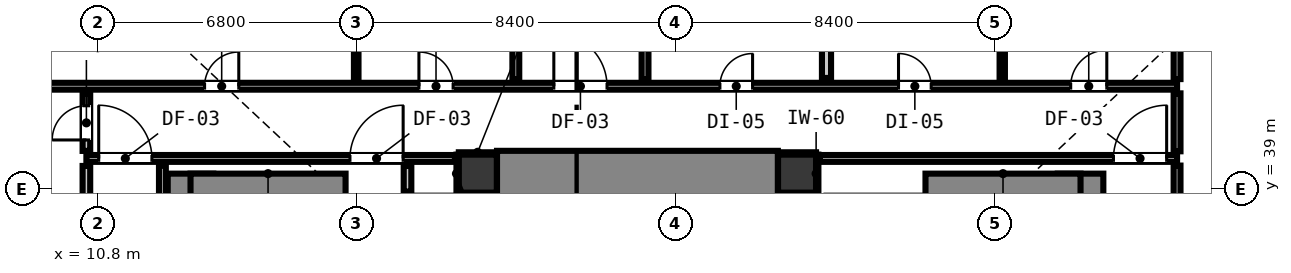
"""IFC4 building model, lengths in metres.
Left out: names, types, materials, properties, quantities, classifications, styles, units other than length and angle.
Written with IfcOpenShell. Run it as: python <this file> out.ifc"""

import sys

from ifc_helpers import new_model, si_unit, direction, frame, frame_2d, origin, origin_2d, place, context, subcontext, project, spatial, rectangle, extrude, element, fill, save


model = new_model("IFC4")
c1 = context("Model", 3, precision=1e-05, world=origin(), true_north=direction((0.0, 1.0)))
c2 = subcontext(c1, "Body", "Model", "MODEL_VIEW")
j1 = project(units=[si_unit("LENGTHUNIT", "METRE"), si_unit("PLANEANGLEUNIT", "RADIAN")], contexts=[c1])
p1 = place(None, origin())
s1 = spatial("IfcSite", under=j1, at=p1, CompositionType="ELEMENT")
p2 = place(p1, origin())
s2 = spatial("IfcBuilding", under=s1, at=p2, CompositionType="ELEMENT")
p3 = place(p2, origin())
s3 = spatial("IfcBuildingStorey", under=s2, at=p3, CompositionType="ELEMENT", Elevation=0.0)
for number, where, z_axis, x_axis in (
    (1, (20.8, 39.4, 0.0), (0.0, 0.0, 1.0), (1.0, 0.0, 0.0)),
    (2, (29.2, 39.4, 0.0), (0.0, 0.0, 1.0), (1.0, 0.0, 0.0)),
):
    element("IfcColumn", number, at=place(p3, frame(where, z_axis=z_axis, x_axis=x_axis)), inside=s3, PredefinedType="COLUMN", context=c2, shape_type="SweptSolid", body=[
        extrude(rectangle(XDim=1.0, YDim=1.0, at=origin_2d()), origin(), (0.0, 0.0, 1.0), 5.2),
    ])
p4 = place(p3, frame((13.24, 31.205, 0.0), z_axis=(0.0, 0.0, 1.0), x_axis=(0.0, 1.0, 0.0)))
e3 = element("IfcWall", 3, at=p4, inside=s3, PredefinedType="SHEAR", context=c2, shape_type="SweptSolid", body=[
    extrude(rectangle(XDim=8.195, YDim=1.2, at=frame_2d((4.097, 0.0))), origin(), (0.0, 0.0, 1.0), 5.2),
])
p5 = place(p3, frame((13.24, 39.1, 0.0), z_axis=(0.0, 0.0, 1.0), x_axis=(1.0, 0.0, 0.0)))
e4 = element("IfcWall", 4, at=p5, inside=s3, PredefinedType="SHEAR", context=c2, shape_type="SweptSolid", body=[
    extrude(rectangle(XDim=4.08, YDim=0.6, at=frame_2d((2.04, 0.0))), origin(), (0.0, 0.0, 1.0), 5.2),
])
p6 = place(p3, frame((36.66, 31.205, 0.0), z_axis=(0.0, 0.0, 1.0), x_axis=(0.0, 1.0, 0.0)))
e5 = element("IfcWall", 5, at=p6, inside=s3, PredefinedType="SHEAR", context=c2, shape_type="SweptSolid", body=[
    extrude(rectangle(XDim=8.195, YDim=1.2, at=frame_2d((4.097, 0.0))), origin(), (0.0, 0.0, 1.0), 5.2),
])
p7 = place(p3, frame((32.58, 39.1, 0.0), z_axis=(0.0, 0.0, 1.0), x_axis=(1.0, 0.0, 0.0)))
e6 = element("IfcWall", 6, at=p7, inside=s3, PredefinedType="SHEAR", context=c2, shape_type="SweptSolid", body=[
    extrude(rectangle(XDim=4.08, YDim=0.6, at=frame_2d((2.04, 0.0))), origin(), (0.0, 0.0, 1.0), 5.2),
])
p8 = place(p3, frame((21.305, 39.4, 0.0), z_axis=(0.0, 0.0, 1.0), x_axis=(1.0, 0.0, 0.0)))
e7 = element("IfcWall", 7, at=p8, inside=s3, PredefinedType="SHEAR", context=c2, shape_type="SweptSolid", body=[
    extrude(rectangle(XDim=7.39, YDim=1.2, at=frame_2d((3.695, 0.0))), origin(), (0.0, 0.0, 1.0), 5.2),
])
p9 = place(p3, frame((10.5, 39.8, 0.0), z_axis=(0.0, 0.0, 1.0), x_axis=(1.0, 0.0, 0.0)))
e8 = element("IfcWall", 8, at=p9, inside=s3, PredefinedType="PARTITIONING", context=c2, shape_type="SweptSolid", body=[
    extrude(rectangle(XDim=9.698, YDim=0.18, at=frame_2d((4.849, 0.0))), origin(), (0.0, 0.0, 1.0), 4.155),
])
p10 = place(p9, frame((6.935, 0.0, 0.0)))
e9 = element("IfcOpeningElement", 9, at=p10, cuts=e8, PredefinedType="OPENING", context=c2, shape_type="SweptSolid", body=[
    extrude(rectangle(XDim=1.4, YDim=2.15, at=frame_2d((0.7, 1.075))), frame((0.0, 0.1, 0.0), z_axis=(0.0, -1.0, 0.0), x_axis=(1.0, 0.0, 0.0)), (0.0, 0.0, 1.0), 0.2),
])
p11 = place(p9, frame((0.324, 0.0, 0.0)))
e10 = element("IfcOpeningElement", 10, at=p11, cuts=e8, PredefinedType="OPENING", context=c2, shape_type="SweptSolid", body=[
    extrude(rectangle(XDim=1.4, YDim=2.15, at=frame_2d((0.7, 1.075))), frame((0.0, 0.1, 0.0), z_axis=(0.0, -1.0, 0.0), x_axis=(1.0, 0.0, 0.0)), (0.0, 0.0, 1.0), 0.2),
])
p12 = place(p3, frame((29.802, 39.8, 0.0), z_axis=(0.0, 0.0, 1.0), x_axis=(1.0, 0.0, 0.0)))
e11 = element("IfcWall", 11, at=p12, inside=s3, PredefinedType="PARTITIONING", context=c2, shape_type="SweptSolid", body=[
    extrude(rectangle(XDim=9.398, YDim=0.18, at=frame_2d((4.699, 0.0))), origin(), (0.0, 0.0, 1.0), 4.155),
])
p13 = place(p12, frame((7.724, 0.0, 0.0)))
e12 = element("IfcOpeningElement", 12, at=p13, cuts=e11, PredefinedType="OPENING", context=c2, shape_type="SweptSolid", body=[
    extrude(rectangle(XDim=1.4, YDim=2.15, at=frame_2d((0.7, 1.075))), frame((0.0, 0.1, 0.0), z_axis=(0.0, -1.0, 0.0), x_axis=(1.0, 0.0, 0.0)), (0.0, 0.0, 1.0), 0.2),
])
p14 = place(p3, frame((4.352, 41.7, 0.0), z_axis=(0.0, 0.0, 1.0), x_axis=(1.0, 0.0, 0.0)))
e13 = element("IfcWall", 13, at=p14, inside=s3, PredefinedType="PARTITIONING", context=c2, shape_type="SweptSolid", body=[
    extrude(rectangle(XDim=34.848, YDim=0.18, at=frame_2d((17.424, 0.0))), origin(), (0.0, 0.0, 1.0), 4.92),
])
p15 = place(p14, frame((18.448, 0.0, 0.0)))
e14 = element("IfcOpeningElement", 14, at=p15, cuts=e13, PredefinedType="OPENING", context=c2, shape_type="SweptSolid", body=[
    extrude(rectangle(XDim=1.4, YDim=2.15, at=frame_2d((0.7, 1.075))), frame((0.0, 0.1, 0.0), z_axis=(0.0, -1.0, 0.0), x_axis=(1.0, 0.0, 0.0)), (0.0, 0.0, 1.0), 0.2),
])
p16 = place(p14, frame((9.258, 0.0, 0.0)))
e15 = element("IfcOpeningElement", 15, at=p16, cuts=e13, PredefinedType="OPENING", context=c2, shape_type="SweptSolid", body=[
    extrude(rectangle(XDim=0.9, YDim=2.1, at=frame_2d((0.45, 1.05))), frame((0.0, 0.1, 0.0), z_axis=(0.0, -1.0, 0.0), x_axis=(1.0, 0.0, 0.0)), (0.0, 0.0, 1.0), 0.2),
])
p17 = place(p14, frame((14.898, 0.0, 0.0)))
e16 = element("IfcOpeningElement", 16, at=p17, cuts=e13, PredefinedType="OPENING", context=c2, shape_type="SweptSolid", body=[
    extrude(rectangle(XDim=0.9, YDim=2.1, at=frame_2d((0.45, 1.05))), frame((0.0, 0.1, 0.0), z_axis=(0.0, -1.0, 0.0), x_axis=(1.0, 0.0, 0.0)), (0.0, 0.0, 1.0), 0.2),
])
p18 = place(p14, frame((22.818, 0.0, 0.0)))
e17 = element("IfcOpeningElement", 17, at=p18, cuts=e13, PredefinedType="OPENING", context=c2, shape_type="SweptSolid", body=[
    extrude(rectangle(XDim=0.86, YDim=2.02, at=frame_2d((0.43, 1.01))), frame((0.0, 0.1, 0.0), z_axis=(0.0, -1.0, 0.0), x_axis=(1.0, 0.0, 0.0)), (0.0, 0.0, 1.0), 0.2),
])
p19 = place(p14, frame((27.518, 0.0, 0.0)))
e18 = element("IfcOpeningElement", 18, at=p19, cuts=e13, PredefinedType="OPENING", context=c2, shape_type="SweptSolid", body=[
    extrude(rectangle(XDim=0.86, YDim=2.02, at=frame_2d((0.43, 1.01))), frame((0.0, 0.1, 0.0), z_axis=(0.0, -1.0, 0.0), x_axis=(1.0, 0.0, 0.0)), (0.0, 0.0, 1.0), 0.2),
])
p20 = place(p14, frame((32.049, 0.0, 0.0)))
e19 = element("IfcOpeningElement", 19, at=p20, cuts=e13, PredefinedType="OPENING", context=c2, shape_type="SweptSolid", body=[
    extrude(rectangle(XDim=0.95, YDim=2.1, at=frame_2d((0.475, 1.05))), frame((0.0, 0.1, 0.0), z_axis=(0.0, -1.0, 0.0), x_axis=(1.0, 0.0, 0.0)), (0.0, 0.0, 1.0), 0.2),
])
p21 = place(p3, frame((29.975, 41.918, 0.0), z_axis=(0.0, 0.0, 1.0), x_axis=(0.0, 1.0, 0.0)))
e20 = element("IfcWall", 20, at=p21, inside=s3, PredefinedType="PARTITIONING", context=c2, shape_type="SweptSolid", body=[
    extrude(rectangle(XDim=4.684, YDim=0.24, at=frame_2d((2.342, 0.0))), origin(), (0.0, 0.0, 1.0), 4.92),
])
p22 = place(p3, frame((10.5, 37.998, 0.0), z_axis=(0.0, 0.0, 1.0), x_axis=(0.0, 1.0, 0.0)))
e21 = element("IfcWall", 21, at=p22, inside=s3, PredefinedType="PARTITIONING", context=c2, shape_type="SweptSolid", body=[
    extrude(rectangle(XDim=1.604, YDim=0.2, at=frame_2d((0.802, 0.0))), origin(), (0.0, 0.0, 1.0), 4.92),
])
p23 = place(p3, frame((10.5, 39.998, 0.0), z_axis=(0.0, 0.0, 1.0), x_axis=(0.0, 1.0, 0.0)))
e22 = element("IfcWall", 22, at=p23, inside=s3, PredefinedType="PARTITIONING", context=c2, shape_type="SweptSolid", body=[
    extrude(rectangle(XDim=1.504, YDim=0.2, at=frame_2d((0.752, 0.0))), origin(), (0.0, 0.0, 1.0), 4.92),
])
p24 = place(p23, frame((0.288, 0.0, 0.0)))
e23 = element("IfcOpeningElement", 23, at=p24, cuts=e22, PredefinedType="OPENING", context=c2, shape_type="SweptSolid", body=[
    extrude(rectangle(XDim=0.9, YDim=2.1, at=frame_2d((0.45, 1.05))), frame((0.0, 0.11, 0.0), z_axis=(0.0, -1.0, 0.0), x_axis=(1.0, 0.0, 0.0)), (0.0, 0.0, 1.0), 0.22),
])
p25 = place(p3, frame((18.95, 38.928, 0.0), z_axis=(0.0, 0.0, 1.0), x_axis=(0.0, 1.0, 0.0)))
e24 = element("IfcWall", 24, at=p25, inside=s3, PredefinedType="PARTITIONING", context=c2, shape_type="SweptSolid", body=[
    extrude(rectangle(XDim=0.674, YDim=0.2, at=frame_2d((0.337, 0.0))), origin(), (0.0, 0.0, 1.0), 4.92),
])
p26 = place(p3, frame((12.5, 21.818, 0.0), z_axis=(0.0, 0.0, 1.0), x_axis=(0.0, 1.0, 0.0)))
e25 = element("IfcWall", 25, at=p26, inside=s3, PredefinedType="PARTITIONING", context=c2, shape_type="SweptSolid", body=[
    extrude(rectangle(XDim=17.794, YDim=0.18, at=frame_2d((8.897, 0.0))), origin(), (0.0, 0.0, 1.0), 4.92),
])
p27 = place(p3, frame((21.8, 41.888, 0.0), z_axis=(0.0, 0.0, 1.0), x_axis=(0.0, 1.0, 0.0)))
e26 = element("IfcWall", 26, at=p27, inside=s3, PredefinedType="PARTITIONING", context=c2, shape_type="SweptSolid", body=[
    extrude(rectangle(XDim=8.96, YDim=0.18, at=frame_2d((4.48, 0.0))), origin(), (0.0, 0.0, 1.0), 4.92),
])
p28 = place(p3, frame((25.2, 41.888, 0.0), z_axis=(0.0, 0.0, 1.0), x_axis=(0.0, 1.0, 0.0)))
e27 = element("IfcWall", 27, at=p28, inside=s3, PredefinedType="PARTITIONING", context=c2, shape_type="SweptSolid", body=[
    extrude(rectangle(XDim=4.744, YDim=0.18, at=frame_2d((2.372, 0.0))), origin(), (0.0, 0.0, 1.0), 4.92),
])
p29 = place(p3, frame((39.2, 21.818, 0.0), z_axis=(0.0, 0.0, 1.0), x_axis=(0.0, 1.0, 0.0)))
e28 = element("IfcWall", 28, at=p29, inside=s3, PredefinedType="PARTITIONING", context=c2, shape_type="SweptSolid", body=[
    extrude(rectangle(XDim=17.794, YDim=0.18, at=frame_2d((8.897, 0.0))), origin(), (0.0, 0.0, 1.0), 4.92),
])
p30 = place(p3, frame((39.2, 39.988, 0.0), z_axis=(0.0, 0.0, 1.0), x_axis=(0.0, 1.0, 0.0)))
e29 = element("IfcWall", 29, at=p30, inside=s3, PredefinedType="PARTITIONING", context=c2, shape_type="SweptSolid", body=[
    extrude(rectangle(XDim=1.524, YDim=0.18, at=frame_2d((0.762, 0.0))), origin(), (0.0, 0.0, 1.0), 4.92),
])
p31 = place(p3, frame((39.2, 41.888, 0.0), z_axis=(0.0, 0.0, 1.0), x_axis=(0.0, 1.0, 0.0)))
e30 = element("IfcWall", 30, at=p31, inside=s3, PredefinedType="PARTITIONING", context=c2, shape_type="SweptSolid", body=[
    extrude(rectangle(XDim=4.744, YDim=0.18, at=frame_2d((2.372, 0.0))), origin(), (0.0, 0.0, 1.0), 4.92),
])
p32 = place(p3, frame((34.6, 41.868, 0.0), z_axis=(0.0, 0.0, 1.0), x_axis=(0.0, 1.0, 0.0)))
e31 = element("IfcWall", 31, at=p32, inside=s3, PredefinedType="PARTITIONING", context=c2, shape_type="SweptSolid", body=[
    extrude(rectangle(XDim=4.784, YDim=0.14, at=frame_2d((2.392, 0.0))), origin(), (0.0, 0.0, 1.0), 4.92),
])
p33 = place(p3, frame((17.6, 41.858, 0.0), z_axis=(0.0, 0.0, 1.0), x_axis=(0.0, 1.0, 0.0)))
e32 = element("IfcWall", 32, at=p33, inside=s3, PredefinedType="PARTITIONING", context=c2, shape_type="SweptSolid", body=[
    extrude(rectangle(XDim=8.99, YDim=0.12, at=frame_2d((4.495, 0.0))), origin(), (0.0, 0.0, 1.0), 4.92),
])
for number, where, z_axis, x_axis in (
    (33, (20.3, 38.868, 0.0), (0.0, 0.0, 1.0), (1.0, 0.0, 0.0)),
    (34, (20.3, 39.932, 0.0), (0.0, 0.0, 1.0), (1.0, 0.0, 0.0)),
):
    element("IfcWall", number, at=place(p3, frame(where, z_axis=z_axis, x_axis=x_axis)), inside=s3, PredefinedType="PARTITIONING", context=c2, shape_type="SweptSolid", body=[
        extrude(rectangle(XDim=0.99, YDim=0.06, at=frame_2d((0.495, 0.0))), origin(), (0.0, 0.0, 1.0), 1.45),
    ])
p34 = place(p3, frame((20.268, 38.9, 0.0), z_axis=(0.0, 0.0, 1.0), x_axis=(0.0, 1.0, 0.0)))
e35 = element("IfcWall", 35, at=p34, inside=s3, PredefinedType="PARTITIONING", context=c2, shape_type="SweptSolid", body=[
    extrude(rectangle(XDim=1.0, YDim=0.06, at=frame_2d((0.5, 0.0))), origin(), (0.0, 0.0, 1.0), 1.45),
])
for number, where, z_axis, x_axis in (
    (36, (28.71, 38.868, 0.0), (0.0, 0.0, 1.0), (1.0, 0.0, 0.0)),
    (37, (28.71, 39.932, 0.0), (0.0, 0.0, 1.0), (1.0, 0.0, 0.0)),
):
    element("IfcWall", number, at=place(p3, frame(where, z_axis=z_axis, x_axis=x_axis)), inside=s3, PredefinedType="PARTITIONING", context=c2, shape_type="SweptSolid", body=[
        extrude(rectangle(XDim=0.99, YDim=0.06, at=frame_2d((0.495, 0.0))), origin(), (0.0, 0.0, 1.0), 1.45),
    ])
p35 = place(p3, frame((29.732, 38.9, 0.0), z_axis=(0.0, 0.0, 1.0), x_axis=(0.0, 1.0, 0.0)))
e38 = element("IfcWall", 38, at=p35, inside=s3, PredefinedType="PARTITIONING", context=c2, shape_type="SweptSolid", body=[
    extrude(rectangle(XDim=1.0, YDim=0.06, at=frame_2d((0.5, 0.0))), origin(), (0.0, 0.0, 1.0), 1.45),
])
p36 = place(p10, origin())
e39 = element("IfcDoor", 39, at=p36, inside=s3, OperationType="SINGLE_SWING_RIGHT", PredefinedType="DOOR", context=c2, shape_type="SweptSolid", body=[
    extrude(rectangle(XDim=1.4, YDim=2.15, at=frame_2d((0.7, 1.075))), frame((0.0, 0.025, 0.0), z_axis=(0.0, -1.0, 0.0), x_axis=(1.0, 0.0, 0.0)), (0.0, 0.0, 1.0), 0.05),
])
fill(e9, e39)
p37 = place(p11, origin())
e40 = element("IfcDoor", 40, at=p37, inside=s3, OperationType="SINGLE_SWING_LEFT", PredefinedType="DOOR", context=c2, shape_type="SweptSolid", body=[
    extrude(rectangle(XDim=1.4, YDim=2.15, at=frame_2d((0.7, 1.075))), frame((0.0, 0.025, 0.0), z_axis=(0.0, -1.0, 0.0), x_axis=(1.0, 0.0, 0.0)), (0.0, 0.0, 1.0), 0.05),
])
fill(e10, e40)
p38 = place(p13, origin())
e41 = element("IfcDoor", 41, at=p38, inside=s3, OperationType="SINGLE_SWING_RIGHT", PredefinedType="DOOR", context=c2, shape_type="SweptSolid", body=[
    extrude(rectangle(XDim=1.4, YDim=2.15, at=frame_2d((0.7, 1.075))), frame((0.0, 0.025, 0.0), z_axis=(0.0, -1.0, 0.0), x_axis=(1.0, 0.0, 0.0)), (0.0, 0.0, 1.0), 0.05),
])
fill(e12, e41)
p39 = place(p15, origin())
e42 = element("IfcDoor", 42, at=p39, inside=s3, OperationType="SINGLE_SWING_LEFT", PredefinedType="DOOR", context=c2, shape_type="SweptSolid", body=[
    extrude(rectangle(XDim=1.4, YDim=2.15, at=frame_2d((0.7, 1.075))), frame((0.0, 0.025, 0.0), z_axis=(0.0, -1.0, 0.0), x_axis=(1.0, 0.0, 0.0)), (0.0, 0.0, 1.0), 0.05),
])
fill(e14, e42)
p40 = place(p24, origin())
e43 = element("IfcDoor", 43, at=p40, inside=s3, OperationType="SINGLE_SWING_LEFT", PredefinedType="DOOR", context=c2, shape_type="SweptSolid", body=[
    extrude(rectangle(XDim=0.9, YDim=2.1, at=frame_2d((0.45, 1.05))), frame((0.0, 0.025, 0.0), z_axis=(0.0, -1.0, 0.0), x_axis=(1.0, 0.0, 0.0)), (0.0, 0.0, 1.0), 0.05),
])
fill(e23, e43)
p41 = place(p16, origin())
e44 = element("IfcDoor", 44, at=p41, inside=s3, OperationType="SINGLE_SWING_RIGHT", PredefinedType="DOOR", context=c2, shape_type="SweptSolid", body=[
    extrude(rectangle(XDim=0.9, YDim=2.1, at=frame_2d((0.45, 1.05))), frame((0.0, 0.025, 0.0), z_axis=(0.0, -1.0, 0.0), x_axis=(1.0, 0.0, 0.0)), (0.0, 0.0, 1.0), 0.05),
])
fill(e15, e44)
p42 = place(p17, origin())
e45 = element("IfcDoor", 45, at=p42, inside=s3, OperationType="SINGLE_SWING_LEFT", PredefinedType="DOOR", context=c2, shape_type="SweptSolid", body=[
    extrude(rectangle(XDim=0.9, YDim=2.1, at=frame_2d((0.45, 1.05))), frame((0.0, 0.025, 0.0), z_axis=(0.0, -1.0, 0.0), x_axis=(1.0, 0.0, 0.0)), (0.0, 0.0, 1.0), 0.05),
])
fill(e16, e45)
p43 = place(p18, origin())
e46 = element("IfcDoor", 46, at=p43, inside=s3, OperationType="SINGLE_SWING_RIGHT", PredefinedType="DOOR", context=c2, shape_type="SweptSolid", body=[
    extrude(rectangle(XDim=0.86, YDim=2.02, at=frame_2d((0.43, 1.01))), frame((0.0, 0.025, 0.0), z_axis=(0.0, -1.0, 0.0), x_axis=(1.0, 0.0, 0.0)), (0.0, 0.0, 1.0), 0.05),
])
fill(e17, e46)
p44 = place(p19, origin())
e47 = element("IfcDoor", 47, at=p44, inside=s3, OperationType="SINGLE_SWING_LEFT", PredefinedType="DOOR", context=c2, shape_type="SweptSolid", body=[
    extrude(rectangle(XDim=0.86, YDim=2.02, at=frame_2d((0.43, 1.01))), frame((0.0, 0.025, 0.0), z_axis=(0.0, -1.0, 0.0), x_axis=(1.0, 0.0, 0.0)), (0.0, 0.0, 1.0), 0.05),
])
fill(e18, e47)
p45 = place(p20, origin())
e48 = element("IfcDoor", 48, at=p45, inside=s3, OperationType="SINGLE_SWING_RIGHT", PredefinedType="DOOR", context=c2, shape_type="SweptSolid", body=[
    extrude(rectangle(XDim=0.95, YDim=2.1, at=frame_2d((0.475, 1.05))), frame((0.0, 0.025, 0.0), z_axis=(0.0, -1.0, 0.0), x_axis=(1.0, 0.0, 0.0)), (0.0, 0.0, 1.0), 0.05),
])
fill(e19, e48)
save(model, sys.argv[1])
